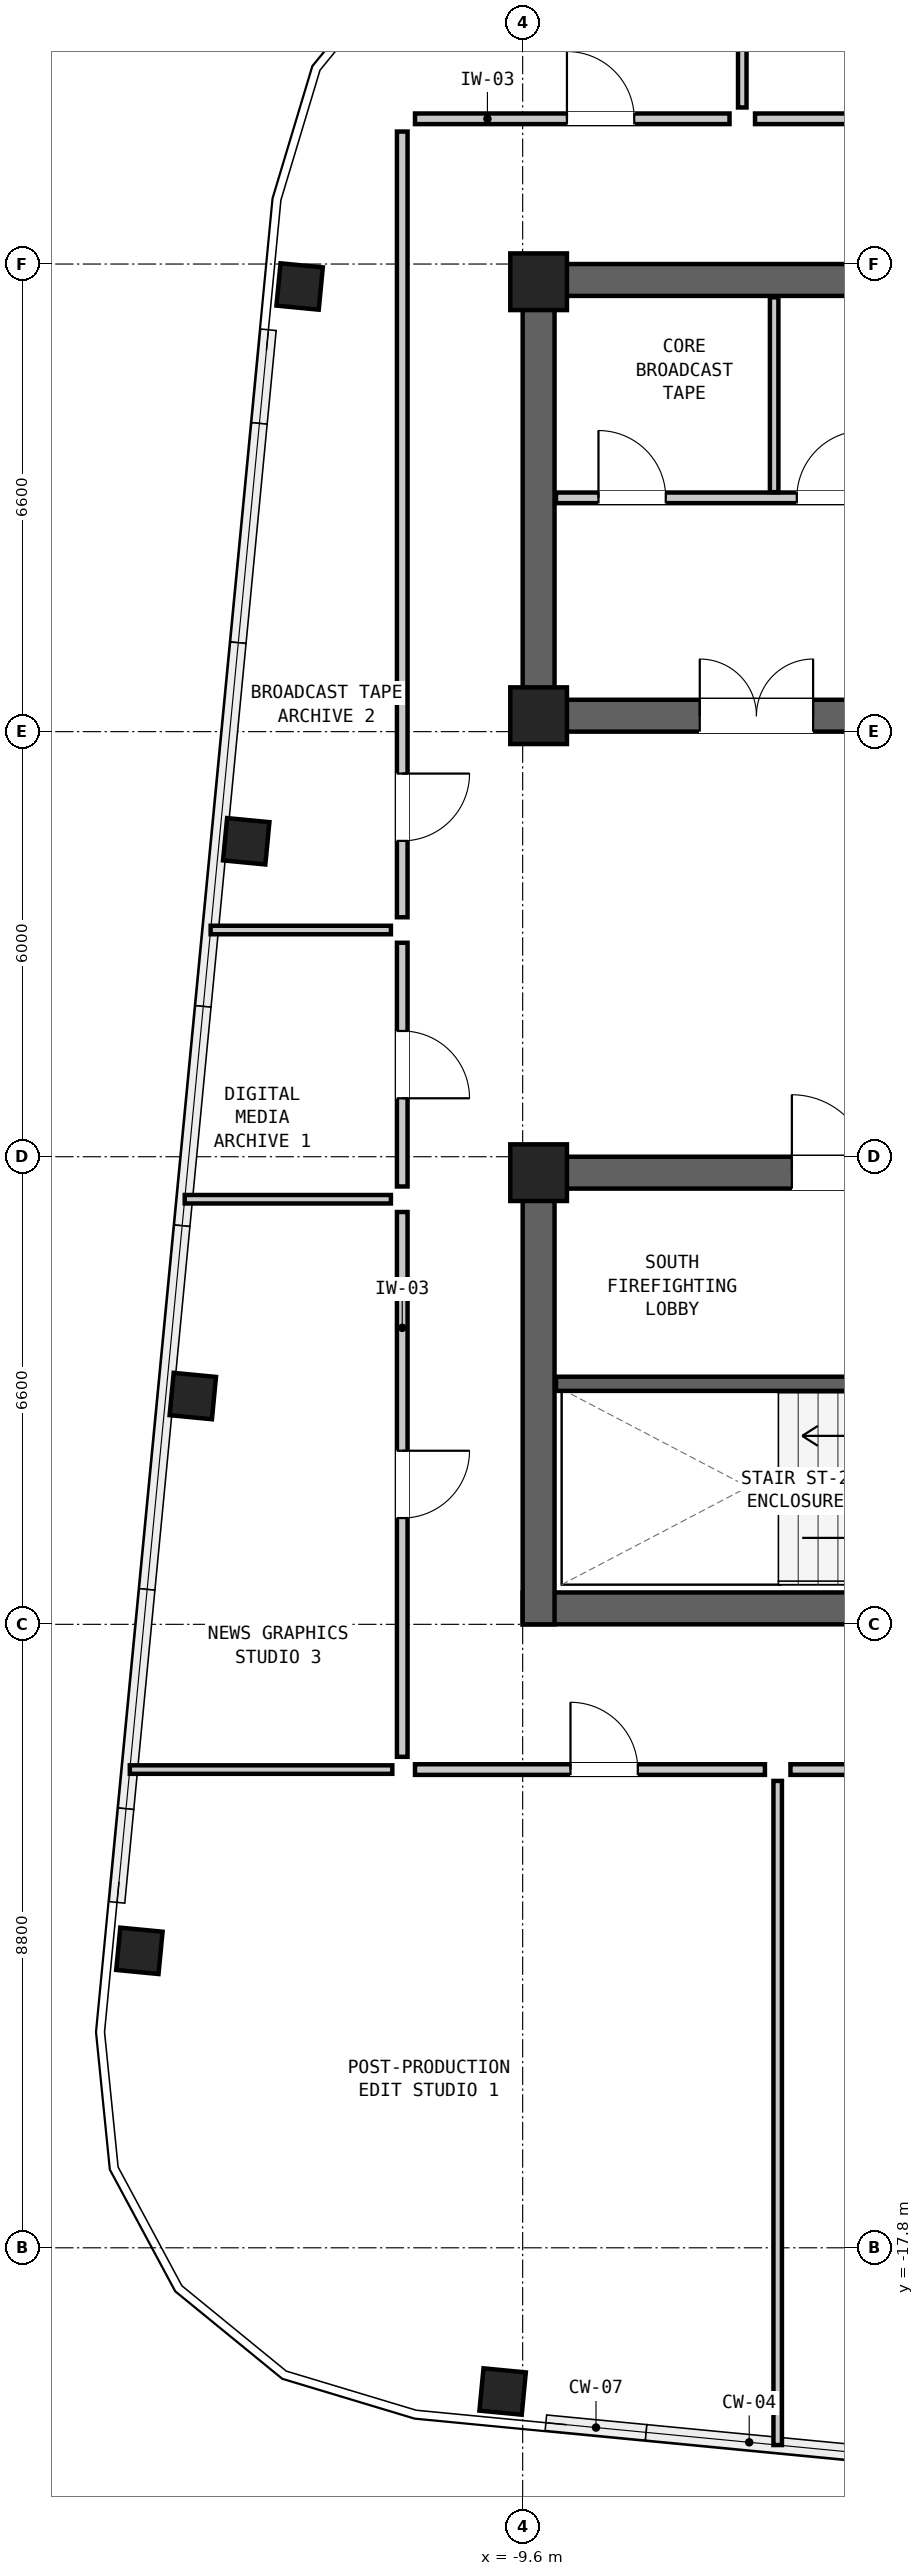
"""IFC4 building model, lengths in metres.
Left out: names, types, materials, properties, quantities, classifications, styles, units other than length and angle.
Written with IfcOpenShell. Run it as: python <this file> out.ifc"""

import sys

from ifc_helpers import new_model, si_unit, direction, frame, frame_2d, origin, origin_2d, place, context, subcontext, project, spatial, rectangle, hollow_rectangle, extrude, element, fill, save


model = new_model("IFC4")
c1 = context("Model", 3, precision=1e-05, world=origin(), true_north=direction((0.0, 1.0)))
c2 = subcontext(c1, "Body", "Model", "MODEL_VIEW")
j1 = project(units=[si_unit("LENGTHUNIT", "METRE"), si_unit("PLANEANGLEUNIT", "RADIAN")], contexts=[c1])
p1 = place(None, origin())
s1 = spatial("IfcSite", under=j1, at=p1, CompositionType="ELEMENT")
p2 = place(p1, origin())
s2 = spatial("IfcBuilding", under=s1, at=p2, CompositionType="ELEMENT")
p3 = place(p2, frame((0.0, 0.0, 261.15)))
s3 = spatial("IfcBuildingStorey", under=s2, at=p3, CompositionType="ELEMENT", Elevation=261.15)
p4 = place(p3, frame((-9.6, 9.975, 0.0), z_axis=(0.0, 0.0, 1.0), x_axis=(1.0, 0.0, 0.0)))
e1 = element("IfcWall", 1, at=p4, inside=s3, PredefinedType="SHEAR", context=c2, shape_type="SweptSolid", body=[
    extrude(rectangle(XDim=19.2, YDim=0.45, at=frame_2d((9.6, 0.0))), origin(), (0.0, 0.0, 1.0), 3.05),
])
p5 = place(p3, frame((-9.6, 3.825, 0.0), z_axis=(0.0, 0.0, 1.0), x_axis=(1.0, 0.0, 0.0)))
e2 = element("IfcWall", 2, at=p5, inside=s3, PredefinedType="SHEAR", context=c2, shape_type="SweptSolid", body=[
    extrude(rectangle(XDim=19.2, YDim=0.45, at=frame_2d((9.6, 0.0))), origin(), (0.0, 0.0, 1.0), 3.05),
])
p6 = place(p5, frame((14.2, 0.0, 0.0)))
e3 = element("IfcOpeningElement", 3, at=p6, cuts=e2, PredefinedType="OPENING", context=c2, shape_type="SweptSolid", body=[
    extrude(rectangle(XDim=1.1, YDim=2.08, at=frame_2d((0.55, 1.04))), frame((0.0, 0.237, 0.0), z_axis=(0.0, -1.0, 0.0), x_axis=(1.0, 0.0, 0.0)), (0.0, 0.0, 1.0), 0.474),
])
p7 = place(p5, frame((8.2, 0.0, 0.0)))
e4 = element("IfcOpeningElement", 4, at=p7, cuts=e2, PredefinedType="OPENING", context=c2, shape_type="SweptSolid", body=[
    extrude(rectangle(XDim=1.15, YDim=2.1, at=frame_2d((0.575, 1.05))), frame((0.0, 0.237, 0.0), z_axis=(0.0, -1.0, 0.0), x_axis=(1.0, 0.0, 0.0)), (0.0, 0.0, 1.0), 0.474),
])
p8 = place(p5, frame((2.5, 0.0, 0.0)))
e5 = element("IfcOpeningElement", 5, at=p8, cuts=e2, PredefinedType="OPENING", context=c2, shape_type="SweptSolid", body=[
    extrude(rectangle(XDim=1.6, YDim=2.12, at=frame_2d((0.8, 1.06))), frame((0.0, 0.237, 0.0), z_axis=(0.0, -1.0, 0.0), x_axis=(1.0, 0.0, 0.0)), (0.0, 0.0, 1.0), 0.474),
])
p9 = place(p3, frame((-9.375, 3.6, 0.0), z_axis=(0.0, 0.0, 1.0), x_axis=(0.0, 1.0, 0.0)))
e6 = element("IfcWall", 6, at=p9, inside=s3, PredefinedType="SHEAR", context=c2, shape_type="SweptSolid", body=[
    extrude(rectangle(XDim=6.6, YDim=0.45, at=frame_2d((3.3, 0.0))), origin(), (0.0, 0.0, 1.0), 3.05),
])
p10 = place(p3, frame((-9.6, -8.775, 0.0), z_axis=(0.0, 0.0, 1.0), x_axis=(1.0, 0.0, 0.0)))
e7 = element("IfcWall", 7, at=p10, inside=s3, PredefinedType="SHEAR", context=c2, shape_type="SweptSolid", body=[
    extrude(rectangle(XDim=19.2, YDim=0.45, at=frame_2d((9.6, 0.0))), origin(), (0.0, 0.0, 1.0), 3.05),
])
p11 = place(p3, frame((-9.6, -2.625, 0.0), z_axis=(0.0, 0.0, 1.0), x_axis=(1.0, 0.0, 0.0)))
e8 = element("IfcWall", 8, at=p11, inside=s3, PredefinedType="SHEAR", context=c2, shape_type="SweptSolid", body=[
    extrude(rectangle(XDim=19.2, YDim=0.45, at=frame_2d((9.6, 0.0))), origin(), (0.0, 0.0, 1.0), 3.05),
])
p12 = place(p11, frame((3.8, 0.0, 0.0)))
e9 = element("IfcOpeningElement", 9, at=p12, cuts=e8, PredefinedType="OPENING", context=c2, shape_type="SweptSolid", body=[
    extrude(rectangle(XDim=1.1, YDim=2.08, at=frame_2d((0.55, 1.04))), frame((0.0, 0.237, 0.0), z_axis=(0.0, -1.0, 0.0), x_axis=(1.0, 0.0, 0.0)), (0.0, 0.0, 1.0), 0.474),
])
p13 = place(p11, frame((10.15, 0.0, 0.0)))
e10 = element("IfcOpeningElement", 10, at=p13, cuts=e8, PredefinedType="OPENING", context=c2, shape_type="SweptSolid", body=[
    extrude(rectangle(XDim=0.9, YDim=2.05, at=frame_2d((0.45, 1.025))), frame((0.0, 0.237, 0.0), z_axis=(0.0, -1.0, 0.0), x_axis=(1.0, 0.0, 0.0)), (0.0, 0.0, 1.0), 0.474),
])
p14 = place(p11, frame((12.1, 0.0, 0.0)))
e11 = element("IfcOpeningElement", 11, at=p14, cuts=e8, PredefinedType="OPENING", context=c2, shape_type="SweptSolid", body=[
    extrude(rectangle(XDim=0.95, YDim=2.1, at=frame_2d((0.475, 1.05))), frame((0.0, 0.237, 0.0), z_axis=(0.0, -1.0, 0.0), x_axis=(1.0, 0.0, 0.0)), (0.0, 0.0, 1.0), 0.474),
])
p15 = place(p11, frame((14.8, 0.0, 0.0)))
e12 = element("IfcOpeningElement", 12, at=p15, cuts=e8, PredefinedType="OPENING", context=c2, shape_type="SweptSolid", body=[
    extrude(rectangle(XDim=1.6, YDim=2.12, at=frame_2d((0.8, 1.06))), frame((0.0, 0.237, 0.0), z_axis=(0.0, -1.0, 0.0), x_axis=(1.0, 0.0, 0.0)), (0.0, 0.0, 1.0), 0.474),
])
p16 = place(p3, frame((-9.375, -9.0, 0.0), z_axis=(0.0, 0.0, 1.0), x_axis=(0.0, 1.0, 0.0)))
e13 = element("IfcWall", 13, at=p16, inside=s3, PredefinedType="SHEAR", context=c2, shape_type="SweptSolid", body=[
    extrude(rectangle(XDim=6.6, YDim=0.45, at=frame_2d((3.3, 0.0))), origin(), (0.0, 0.0, 1.0), 3.05),
])
for number, where, z_axis, x_axis in (
    (14, (-9.883, -19.829, 0.0), (0.0, 0.0, 1.0), (0.995, -0.096, 0.0)),
    (15, (-12.749, 9.883, 0.0), (0.0, 0.0, 1.0), (0.096, 0.995, 0.0)),
    (16, (-13.502, 2.052, 0.0), (0.0, 0.0, 1.0), (0.096, 0.995, 0.0)),
    (17, (-14.256, -5.778, 0.0), (0.0, 0.0, 1.0), (0.096, 0.995, 0.0)),
    (18, (-15.01, -13.608, 0.0), (0.0, 0.0, 1.0), (0.096, 0.995, 0.0)),
):
    element("IfcColumn", number, at=place(p3, frame(where, z_axis=z_axis, x_axis=x_axis)), inside=s3, PredefinedType="COLUMN", context=c2, shape_type="SweptSolid", body=[
        extrude(hollow_rectangle(XDim=0.6, YDim=0.6, WallThickness=0.04, at=origin_2d()), origin(), (0.0, 0.0, 1.0), 3.05),
    ])
for number, where, z_axis, x_axis in (
    (19, (-9.375, 9.95, 0.0), (0.0, 0.0, 1.0), (1.0, 0.0, 0.0)),
    (20, (-9.375, 3.825, 0.0), (0.0, 0.0, 1.0), (1.0, 0.0, 0.0)),
    (21, (-9.375, -2.625, 0.0), (0.0, 0.0, 1.0), (1.0, 0.0, 0.0)),
):
    element("IfcColumn", number, at=place(p3, frame(where, z_axis=z_axis, x_axis=x_axis)), inside=s3, PredefinedType="COLUMN", context=c2, shape_type="SweptSolid", body=[
        extrude(rectangle(XDim=0.8, YDim=0.8, at=origin_2d()), origin(), (0.0, 0.0, 1.0), 3.05),
    ])
p17 = place(p3, frame((-9.13, 6.9, 0.0), z_axis=(0.0, 0.0, 1.0), x_axis=(1.0, 0.0, 0.0)))
e22 = element("IfcWall", 22, at=p17, inside=s3, PredefinedType="PARTITIONING", context=c2, shape_type="SweptSolid", body=[
    extrude(rectangle(XDim=6.01, YDim=0.15, at=frame_2d((3.005, 0.0))), origin(), (0.0, 0.0, 1.0), 2.86),
])
p18 = place(p17, frame((0.6, 0.0, 0.0)))
e23 = element("IfcOpeningElement", 23, at=p18, cuts=e22, PredefinedType="OPENING", context=c2, shape_type="SweptSolid", body=[
    extrude(rectangle(XDim=0.95, YDim=2.1, at=frame_2d((0.475, 1.05))), frame((0.0, 0.087, 0.0), z_axis=(0.0, -1.0, 0.0), x_axis=(1.0, 0.0, 0.0)), (0.0, 0.0, 1.0), 0.174),
])
p19 = place(p17, frame((3.4, 0.0, 0.0)))
e24 = element("IfcOpeningElement", 24, at=p19, cuts=e22, PredefinedType="OPENING", context=c2, shape_type="SweptSolid", body=[
    extrude(rectangle(XDim=0.95, YDim=2.1, at=frame_2d((0.475, 1.05))), frame((0.0, 0.087, 0.0), z_axis=(0.0, -1.0, 0.0), x_axis=(1.0, 0.0, 0.0)), (0.0, 0.0, 1.0), 0.174),
])
p20 = place(p3, frame((-6.05, 6.98, 0.0), z_axis=(0.0, 0.0, 1.0), x_axis=(0.0, 1.0, 0.0)))
e25 = element("IfcWall", 25, at=p20, inside=s3, PredefinedType="PARTITIONING", context=c2, shape_type="SweptSolid", body=[
    extrude(rectangle(XDim=2.75, YDim=0.12, at=frame_2d((1.375, 0.0))), origin(), (0.0, 0.0, 1.0), 2.86),
])
p21 = place(p3, frame((-9.13, -5.605, 0.0), z_axis=(0.0, 0.0, 1.0), x_axis=(1.0, 0.0, 0.0)))
e26 = element("IfcWall", 26, at=p21, inside=s3, PredefinedType="SHEAR", context=c2, shape_type="SweptSolid", body=[
    extrude(rectangle(XDim=6.77, YDim=0.2, at=frame_2d((3.385, 0.0))), origin(), (0.0, 0.0, 1.0), 2.86),
])
p22 = place(p21, frame((5.5, 0.0, 0.0)))
e27 = element("IfcOpeningElement", 27, at=p22, cuts=e26, PredefinedType="OPENING", context=c2, shape_type="SweptSolid", body=[
    extrude(rectangle(XDim=1.05, YDim=2.08, at=frame_2d((0.525, 1.04))), frame((0.0, 0.112, 0.0), z_axis=(0.0, -1.0, 0.0), x_axis=(1.0, 0.0, 0.0)), (0.0, 0.0, 1.0), 0.224),
])
p23 = place(p3, frame((-15.146, -11.05, 0.0), z_axis=(0.0, 0.0, 1.0), x_axis=(1.0, 0.0, 0.0)))
e28 = element("IfcWall", 28, at=p23, inside=s3, PredefinedType="PARTITIONING", context=c2, shape_type="SweptSolid", body=[
    extrude(rectangle(XDim=3.706, YDim=0.12, at=frame_2d((1.853, 0.0))), origin(), (0.0, 0.0, 1.0), 2.86),
])
p24 = place(p3, frame((-6.5, 12.41, 0.0), z_axis=(0.0, 0.0, 1.0), x_axis=(0.0, 1.0, 0.0)))
e29 = element("IfcWall", 29, at=p24, inside=s3, PredefinedType="PARTITIONING", context=c2, shape_type="SweptSolid", body=[
    extrude(rectangle(XDim=2.979, YDim=0.12, at=frame_2d((1.49, 0.0))), origin(), (0.0, 0.0, 1.0), 2.381),
])
p25 = place(p3, frame((-6.0, -20.584, 0.0), z_axis=(0.0, 0.0, 1.0), x_axis=(0.0, 1.0, 0.0)))
e30 = element("IfcWall", 30, at=p25, inside=s3, PredefinedType="PARTITIONING", context=c2, shape_type="SweptSolid", body=[
    extrude(rectangle(XDim=9.374, YDim=0.12, at=frame_2d((4.687, 0.0))), origin(), (0.0, 0.0, 1.0), 2.381),
])
p26 = place(p3, frame((-14.371, -3.0, 0.0), z_axis=(0.0, 0.0, 1.0), x_axis=(1.0, 0.0, 0.0)))
e31 = element("IfcWall", 31, at=p26, inside=s3, PredefinedType="PARTITIONING", context=c2, shape_type="SweptSolid", body=[
    extrude(rectangle(XDim=2.911, YDim=0.12, at=frame_2d((1.455, 0.0))), origin(), (0.0, 0.0, 1.0), 1.981),
])
p27 = place(p3, frame((-14.005, 0.8, 0.0), z_axis=(0.0, 0.0, 1.0), x_axis=(1.0, 0.0, 0.0)))
e32 = element("IfcWall", 32, at=p27, inside=s3, PredefinedType="PARTITIONING", context=c2, shape_type="SweptSolid", body=[
    extrude(rectangle(XDim=2.545, YDim=0.12, at=frame_2d((1.272, 0.0))), origin(), (0.0, 0.0, 1.0), 2.381),
])
p28 = place(p3, frame((-11.12, 12.25, 0.0), z_axis=(0.0, 0.0, 1.0), x_axis=(1.0, 0.0, 0.0)))
e33 = element("IfcWall", 33, at=p28, inside=s3, PredefinedType="PARTITIONING", context=c2, shape_type="SweptSolid", body=[
    extrude(rectangle(XDim=4.44, YDim=0.15, at=frame_2d((2.22, 0.0))), origin(), (0.0, 0.0, 1.0), 2.86),
])
p29 = place(p28, frame((2.145, 0.0, 0.0)))
e34 = element("IfcOpeningElement", 34, at=p29, cuts=e33, PredefinedType="OPENING", context=c2, shape_type="SweptSolid", body=[
    extrude(rectangle(XDim=0.95, YDim=2.1, at=frame_2d((0.475, 1.05))), frame((0.0, 0.087, 0.0), z_axis=(0.0, -1.0, 0.0), x_axis=(1.0, 0.0, 0.0)), (0.0, 0.0, 1.0), 0.174),
])
p30 = place(p3, frame((-6.32, 12.25, 0.0), z_axis=(0.0, 0.0, 1.0), x_axis=(1.0, 0.0, 0.0)))
e35 = element("IfcWall", 35, at=p30, inside=s3, PredefinedType="PARTITIONING", context=c2, shape_type="SweptSolid", body=[
    extrude(rectangle(XDim=6.14, YDim=0.15, at=frame_2d((3.07, 0.0))), origin(), (0.0, 0.0, 1.0), 2.86),
])
p31 = place(p30, frame((2.595, 0.0, 0.0)))
e36 = element("IfcOpeningElement", 36, at=p31, cuts=e35, PredefinedType="OPENING", context=c2, shape_type="SweptSolid", body=[
    extrude(rectangle(XDim=0.95, YDim=2.1, at=frame_2d((0.475, 1.05))), frame((0.0, 0.087, 0.0), z_axis=(0.0, -1.0, 0.0), x_axis=(1.0, 0.0, 0.0)), (0.0, 0.0, 1.0), 0.174),
])
p32 = place(p3, frame((-11.12, -11.05, 0.0), z_axis=(0.0, 0.0, 1.0), x_axis=(1.0, 0.0, 0.0)))
e37 = element("IfcWall", 37, at=p32, inside=s3, PredefinedType="PARTITIONING", context=c2, shape_type="SweptSolid", body=[
    extrude(rectangle(XDim=4.94, YDim=0.15, at=frame_2d((2.47, 0.0))), origin(), (0.0, 0.0, 1.0), 2.86),
])
p33 = place(p32, frame((2.195, 0.0, 0.0)))
e38 = element("IfcOpeningElement", 38, at=p33, cuts=e37, PredefinedType="OPENING", context=c2, shape_type="SweptSolid", body=[
    extrude(rectangle(XDim=0.95, YDim=2.1, at=frame_2d((0.475, 1.05))), frame((0.0, 0.087, 0.0), z_axis=(0.0, -1.0, 0.0), x_axis=(1.0, 0.0, 0.0)), (0.0, 0.0, 1.0), 0.174),
])
p34 = place(p3, frame((-5.82, -11.05, 0.0), z_axis=(0.0, 0.0, 1.0), x_axis=(1.0, 0.0, 0.0)))
e39 = element("IfcWall", 39, at=p34, inside=s3, PredefinedType="PARTITIONING", context=c2, shape_type="SweptSolid", body=[
    extrude(rectangle(XDim=7.14, YDim=0.15, at=frame_2d((3.57, 0.0))), origin(), (0.0, 0.0, 1.0), 2.86),
])
p35 = place(p34, frame((3.095, 0.0, 0.0)))
e40 = element("IfcOpeningElement", 40, at=p35, cuts=e39, PredefinedType="OPENING", context=c2, shape_type="SweptSolid", body=[
    extrude(rectangle(XDim=0.95, YDim=2.1, at=frame_2d((0.475, 1.05))), frame((0.0, 0.087, 0.0), z_axis=(0.0, -1.0, 0.0), x_axis=(1.0, 0.0, 0.0)), (0.0, 0.0, 1.0), 0.174),
])
p36 = place(p3, frame((-11.3, -3.18, 0.0), z_axis=(0.0, 0.0, 1.0), x_axis=(0.0, -1.0, 0.0)))
e41 = element("IfcWall", 41, at=p36, inside=s3, PredefinedType="PARTITIONING", context=c2, shape_type="SweptSolid", body=[
    extrude(rectangle(XDim=7.69, YDim=0.15, at=frame_2d((3.845, 0.0))), origin(), (0.0, 0.0, 1.0), 2.86),
])
p37 = place(p36, frame((3.37, 0.0, 0.0)))
e42 = element("IfcOpeningElement", 42, at=p37, cuts=e41, PredefinedType="OPENING", context=c2, shape_type="SweptSolid", body=[
    extrude(rectangle(XDim=0.95, YDim=2.1, at=frame_2d((0.475, 1.05))), frame((0.0, 0.087, 0.0), z_axis=(0.0, -1.0, 0.0), x_axis=(1.0, 0.0, 0.0)), (0.0, 0.0, 1.0), 0.174),
])
p38 = place(p3, frame((-11.3, 0.62, 0.0), z_axis=(0.0, 0.0, 1.0), x_axis=(0.0, -1.0, 0.0)))
e43 = element("IfcWall", 43, at=p38, inside=s3, PredefinedType="PARTITIONING", context=c2, shape_type="SweptSolid", body=[
    extrude(rectangle(XDim=3.44, YDim=0.15, at=frame_2d((1.72, 0.0))), origin(), (0.0, 0.0, 1.0), 2.86),
])
p39 = place(p38, frame((1.245, 0.0, 0.0)))
e44 = element("IfcOpeningElement", 44, at=p39, cuts=e43, PredefinedType="OPENING", context=c2, shape_type="SweptSolid", body=[
    extrude(rectangle(XDim=0.95, YDim=2.1, at=frame_2d((0.475, 1.05))), frame((0.0, 0.087, 0.0), z_axis=(0.0, -1.0, 0.0), x_axis=(1.0, 0.0, 0.0)), (0.0, 0.0, 1.0), 0.174),
])
p40 = place(p3, frame((-11.3, 12.07, 0.0), z_axis=(0.0, 0.0, 1.0), x_axis=(0.0, -1.0, 0.0)))
e45 = element("IfcWall", 45, at=p40, inside=s3, PredefinedType="PARTITIONING", context=c2, shape_type="SweptSolid", body=[
    extrude(rectangle(XDim=11.09, YDim=0.15, at=frame_2d((5.545, 0.0))), origin(), (0.0, 0.0, 1.0), 2.86),
])
p41 = place(p40, frame((9.062, 0.0, 0.0)))
e46 = element("IfcOpeningElement", 46, at=p41, cuts=e45, PredefinedType="OPENING", context=c2, shape_type="SweptSolid", body=[
    extrude(rectangle(XDim=0.95, YDim=2.1, at=frame_2d((0.475, 1.05))), frame((0.0, 0.087, 0.0), z_axis=(0.0, -1.0, 0.0), x_axis=(1.0, 0.0, 0.0)), (0.0, 0.0, 1.0), 0.174),
])
p42 = place(p8, origin())
e47 = element("IfcDoor", 47, at=p42, inside=s3, OperationType="DOUBLE_DOOR_SINGLE_SWING", PredefinedType="DOOR", context=c2, shape_type="SweptSolid", body=[
    extrude(rectangle(XDim=1.6, YDim=2.12, at=frame_2d((0.8, 1.06))), frame((0.0, 0.025, 0.0), z_axis=(0.0, -1.0, 0.0), x_axis=(1.0, 0.0, 0.0)), (0.0, 0.0, 1.0), 0.05),
])
fill(e5, e47)
p43 = place(p18, origin())
e48 = element("IfcDoor", 48, at=p43, inside=s3, OperationType="SINGLE_SWING_LEFT", PredefinedType="DOOR", context=c2, shape_type="SweptSolid", body=[
    extrude(rectangle(XDim=0.95, YDim=2.1, at=frame_2d((0.475, 1.05))), frame((0.0, 0.025, 0.0), z_axis=(0.0, -1.0, 0.0), x_axis=(1.0, 0.0, 0.0)), (0.0, 0.0, 1.0), 0.05),
])
fill(e23, e48)
p44 = place(p19, origin())
e49 = element("IfcDoor", 49, at=p44, inside=s3, OperationType="SINGLE_SWING_RIGHT", PredefinedType="DOOR", context=c2, shape_type="SweptSolid", body=[
    extrude(rectangle(XDim=0.95, YDim=2.1, at=frame_2d((0.475, 1.05))), frame((0.0, 0.025, 0.0), z_axis=(0.0, -1.0, 0.0), x_axis=(1.0, 0.0, 0.0)), (0.0, 0.0, 1.0), 0.05),
])
fill(e24, e49)
p45 = place(p12, origin())
e50 = element("IfcDoor", 50, at=p45, inside=s3, OperationType="SINGLE_SWING_LEFT", PredefinedType="DOOR", context=c2, shape_type="SweptSolid", body=[
    extrude(rectangle(XDim=1.1, YDim=2.08, at=frame_2d((0.55, 1.04))), frame((0.0, 0.025, 0.0), z_axis=(0.0, -1.0, 0.0), x_axis=(1.0, 0.0, 0.0)), (0.0, 0.0, 1.0), 0.05),
])
fill(e9, e50)
p46 = place(p29, origin())
e51 = element("IfcDoor", 51, at=p46, inside=s3, OperationType="SINGLE_SWING_LEFT", PredefinedType="DOOR", context=c2, shape_type="SweptSolid", body=[
    extrude(rectangle(XDim=0.95, YDim=2.1, at=frame_2d((0.475, 1.05))), frame((0.0, 0.025, 0.0), z_axis=(0.0, -1.0, 0.0), x_axis=(1.0, 0.0, 0.0)), (0.0, 0.0, 1.0), 0.05),
])
fill(e34, e51)
p47 = place(p33, origin())
e52 = element("IfcDoor", 52, at=p47, inside=s3, OperationType="SINGLE_SWING_LEFT", PredefinedType="DOOR", context=c2, shape_type="SweptSolid", body=[
    extrude(rectangle(XDim=0.95, YDim=2.1, at=frame_2d((0.475, 1.05))), frame((0.0, 0.025, 0.0), z_axis=(0.0, -1.0, 0.0), x_axis=(1.0, 0.0, 0.0)), (0.0, 0.0, 1.0), 0.05),
])
fill(e38, e52)
p48 = place(p37, origin())
e53 = element("IfcDoor", 53, at=p48, inside=s3, OperationType="SINGLE_SWING_LEFT", PredefinedType="DOOR", context=c2, shape_type="SweptSolid", body=[
    extrude(rectangle(XDim=0.95, YDim=2.1, at=frame_2d((0.475, 1.05))), frame((0.0, 0.025, 0.0), z_axis=(0.0, -1.0, 0.0), x_axis=(1.0, 0.0, 0.0)), (0.0, 0.0, 1.0), 0.05),
])
fill(e42, e53)
p49 = place(p39, origin())
e54 = element("IfcDoor", 54, at=p49, inside=s3, OperationType="SINGLE_SWING_RIGHT", PredefinedType="DOOR", context=c2, shape_type="SweptSolid", body=[
    extrude(rectangle(XDim=0.95, YDim=2.1, at=frame_2d((0.475, 1.05))), frame((0.0, 0.025, 0.0), z_axis=(0.0, -1.0, 0.0), x_axis=(1.0, 0.0, 0.0)), (0.0, 0.0, 1.0), 0.05),
])
fill(e44, e54)
p50 = place(p41, origin())
e55 = element("IfcDoor", 55, at=p50, inside=s3, OperationType="SINGLE_SWING_LEFT", PredefinedType="DOOR", context=c2, shape_type="SweptSolid", body=[
    extrude(rectangle(XDim=0.95, YDim=2.1, at=frame_2d((0.475, 1.05))), frame((0.0, 0.025, 0.0), z_axis=(0.0, -1.0, 0.0), x_axis=(1.0, 0.0, 0.0)), (0.0, 0.0, 1.0), 0.05),
])
fill(e46, e55)
save(model, sys.argv[1])
